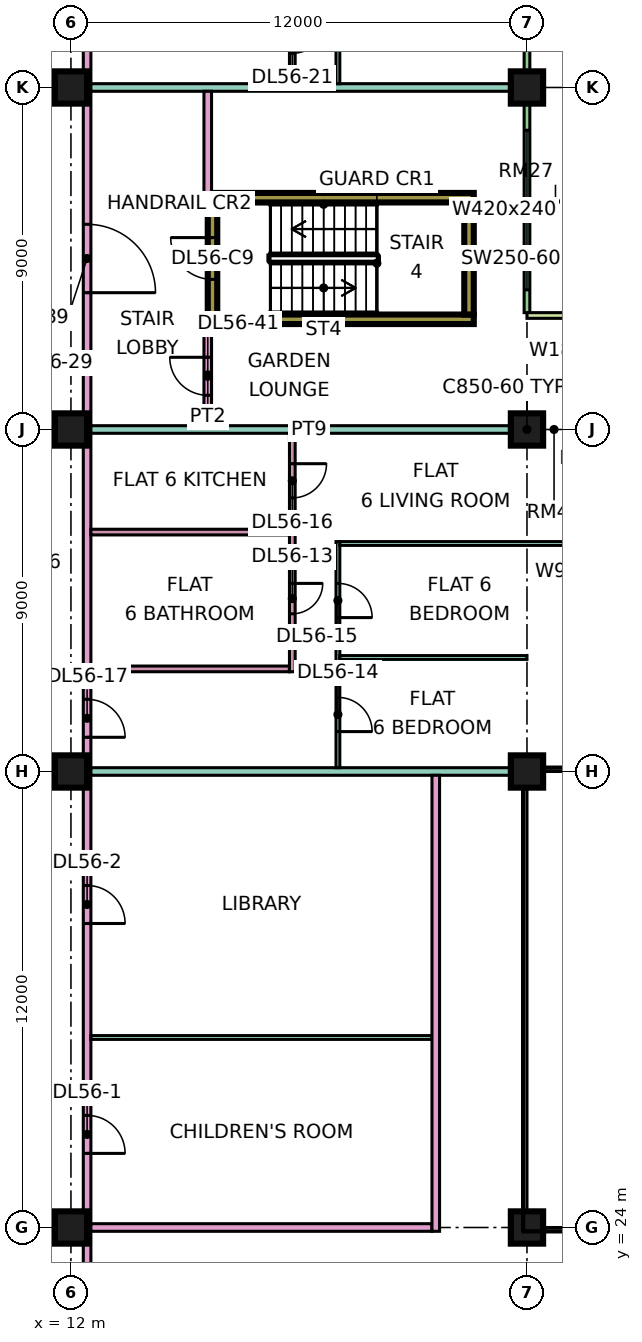
"""IFC4 building model, lengths in metres.
Left out: names, types, materials, properties, quantities, classifications, styles, units other than length and angle.
Written with IfcOpenShell. Run it as: python <this file> out.ifc"""

import sys

from ifc_helpers import new_model, si_unit, direction, frame, frame_2d, origin, origin_2d, place, context, subcontext, project, spatial, rectangle, extrude, element, fill, save


model = new_model("IFC4")
c1 = context("Model", 3, precision=1e-05, world=origin(), true_north=direction((0.0, 1.0)))
c2 = subcontext(c1, "Body", "Model", "MODEL_VIEW")
j1 = project(units=[si_unit("LENGTHUNIT", "METRE"), si_unit("PLANEANGLEUNIT", "RADIAN")], contexts=[c1])
p1 = place(None, origin())
s1 = spatial("IfcSite", under=j1, at=p1, CompositionType="ELEMENT")
p2 = place(p1, origin())
s2 = spatial("IfcBuilding", under=s1, at=p2, CompositionType="ELEMENT")
p3 = place(p2, frame((0.0, 0.0, 237.9)))
s3 = spatial("IfcBuildingStorey", under=s2, at=p3, CompositionType="ELEMENT", Elevation=237.9)
for number, where, z_axis, x_axis in (
    (1, (12.0, 24.0, 0.0), (0.0, 0.0, 1.0), (1.0, 0.0, 0.0)),
    (2, (12.0, 36.0, 0.0), (0.0, 0.0, 1.0), (1.0, 0.0, 0.0)),
    (3, (12.0, 45.0, 0.0), (0.0, 0.0, 1.0), (1.0, 0.0, 0.0)),
    (4, (12.0, 54.0, 0.0), (0.0, 0.0, 1.0), (1.0, 0.0, 0.0)),
    (5, (24.0, 24.0, 0.0), (0.0, 0.0, 1.0), (1.0, 0.0, 0.0)),
    (6, (24.0, 36.0, 0.0), (0.0, 0.0, 1.0), (1.0, 0.0, 0.0)),
    (7, (24.0, 45.0, 0.0), (0.0, 0.0, 1.0), (1.0, 0.0, 0.0)),
    (8, (24.0, 54.0, 0.0), (0.0, 0.0, 1.0), (1.0, 0.0, 0.0)),
):
    element("IfcColumn", number, at=place(p3, frame(where, z_axis=z_axis, x_axis=x_axis)), inside=s3, PredefinedType="COLUMN", context=c2, shape_type="SweptSolid", body=[
        extrude(rectangle(XDim=0.85, YDim=0.85, at=origin_2d()), origin(), (0.0, 0.0, 1.0), 3.75),
    ])
for number, where, z_axis, x_axis in (
    (9, (15.6, 47.9, 0.0), (0.0, 0.0, 1.0), (1.0, 0.0, 0.0)),
    (10, (15.6, 51.1, 0.0), (0.0, 0.0, 1.0), (1.0, 0.0, 0.0)),
):
    element("IfcWall", number, at=place(p3, frame(where, z_axis=z_axis, x_axis=x_axis)), inside=s3, PredefinedType="SHEAR", context=c2, shape_type="SweptSolid", body=[
        extrude(rectangle(XDim=7.0, YDim=0.25, at=frame_2d((3.5, 0.0))), origin(), (0.0, 0.0, 1.0), 3.75),
    ])
p4 = place(p3, frame((15.725, 48.025, 0.0), z_axis=(0.0, 0.0, 1.0), x_axis=(0.0, 1.0, 0.0)))
e11 = element("IfcWall", 11, at=p4, inside=s3, PredefinedType="SHEAR", context=c2, shape_type="SweptSolid", body=[
    extrude(rectangle(XDim=2.95, YDim=0.25, at=frame_2d((1.475, 0.0))), origin(), (0.0, 0.0, 1.0), 3.75),
])
p5 = place(p4, frame((0.925, 0.0, 0.0)))
e12 = element("IfcOpeningElement", 12, at=p5, cuts=e11, PredefinedType="OPENING", context=c2, shape_type="SweptSolid", body=[
    extrude(rectangle(XDim=1.1, YDim=2.2, at=frame_2d((0.55, 1.1))), frame((0.0, 0.135, 0.0), z_axis=(0.0, -1.0, 0.0), x_axis=(1.0, 0.0, 0.0)), (0.0, 0.0, 1.0), 0.27),
])
p6 = place(p3, frame((22.475, 48.025, 0.0), z_axis=(0.0, 0.0, 1.0), x_axis=(0.0, 1.0, 0.0)))
e13 = element("IfcWall", 13, at=p6, inside=s3, PredefinedType="SHEAR", context=c2, shape_type="SweptSolid", body=[
    extrude(rectangle(XDim=2.95, YDim=0.25, at=frame_2d((1.475, 0.0))), origin(), (0.0, 0.0, 1.0), 3.75),
])
p7 = place(p3, frame((24.0, 48.075, 0.0), z_axis=(0.0, 0.0, 1.0), x_axis=(0.0, 1.0, 0.0)))
e14 = element("IfcWall", 14, at=p7, inside=s3, PredefinedType="SOLIDWALL", context=c2, shape_type="SweptSolid", body=[
    extrude(rectangle(XDim=13.35, YDim=0.15, at=frame_2d((6.675, 0.0))), origin(), (0.0, 0.0, 1.0), 3.35),
])
p8 = place(p7, frame((0.6, 0.0, 0.45)))
e15 = element("IfcOpeningElement", 15, at=p8, cuts=e14, PredefinedType="OPENING", context=c2, shape_type="SweptSolid", body=[
    extrude(rectangle(XDim=4.2, YDim=2.4, at=frame_2d((2.1, 1.2))), frame((0.0, 0.085, 0.0), z_axis=(0.0, -1.0, 0.0), x_axis=(1.0, 0.0, 0.0)), (0.0, 0.0, 1.0), 0.17),
])
p9 = place(p7, frame((7.087, 0.0, 0.0)))
e16 = element("IfcOpeningElement", 16, at=p9, cuts=e14, PredefinedType="OPENING", context=c2, shape_type="SweptSolid", body=[
    extrude(rectangle(XDim=1.2, YDim=2.4, at=frame_2d((0.6, 1.2))), frame((0.0, 0.085, 0.0), z_axis=(0.0, -1.0, 0.0), x_axis=(1.0, 0.0, 0.0)), (0.0, 0.0, 1.0), 0.17),
])
p10 = place(p7, frame((9.525, 0.0, 0.45)))
e17 = element("IfcOpeningElement", 17, at=p10, cuts=e14, PredefinedType="OPENING", context=c2, shape_type="SweptSolid", body=[
    extrude(rectangle(XDim=1.8, YDim=2.4, at=frame_2d((0.9, 1.2))), frame((0.0, 0.085, 0.0), z_axis=(0.0, -1.0, 0.0), x_axis=(1.0, 0.0, 0.0)), (0.0, 0.0, 1.0), 0.17),
])
p11 = place(p7, frame((12.188, 0.0, 0.45)))
e18 = element("IfcOpeningElement", 18, at=p11, cuts=e14, PredefinedType="OPENING", context=c2, shape_type="SweptSolid", body=[
    extrude(rectangle(XDim=0.9, YDim=2.4, at=frame_2d((0.45, 1.2))), frame((0.0, 0.085, 0.0), z_axis=(0.0, -1.0, 0.0), x_axis=(1.0, 0.0, 0.0)), (0.0, 0.0, 1.0), 0.17),
])
p12 = place(p3, frame((25.5, 48.0, 0.0), z_axis=(0.0, 0.0, 1.0), x_axis=(-1.0, 0.0, 0.0)))
e19 = element("IfcWall", 19, at=p12, inside=s3, PredefinedType="SOLIDWALL", context=c2, shape_type="SweptSolid", body=[
    extrude(rectangle(XDim=1.5, YDim=0.15, at=frame_2d((0.75, 0.0))), origin(), (0.0, 0.0, 1.0), 3.35),
])
p13 = place(p3, frame((12.425, 20.0, 0.0), z_axis=(0.0, 0.0, 1.0), x_axis=(0.0, 1.0, 0.0)))
e20 = element("IfcWall", 20, at=p13, inside=s3, PredefinedType="PARTITIONING", context=c2, shape_type="SweptSolid", body=[
    extrude(rectangle(XDim=43.0, YDim=0.2, at=frame_2d((21.5, 0.0))), origin(), (0.0, 0.0, 1.0), 3.35),
])
p14 = place(p13, frame((5.95, 0.0, 0.0)))
e21 = element("IfcOpeningElement", 21, at=p14, cuts=e20, PredefinedType="OPENING", context=c2, shape_type="SweptSolid", body=[
    extrude(rectangle(XDim=1.0, YDim=2.1, at=frame_2d((0.5, 1.05))), frame((0.0, 0.11, 0.0), z_axis=(0.0, -1.0, 0.0), x_axis=(1.0, 0.0, 0.0)), (0.0, 0.0, 1.0), 0.22),
])
p15 = place(p13, frame((12.0, 0.0, 0.0)))
e22 = element("IfcOpeningElement", 22, at=p15, cuts=e20, PredefinedType="OPENING", context=c2, shape_type="SweptSolid", body=[
    extrude(rectangle(XDim=1.0, YDim=2.1, at=frame_2d((0.5, 1.05))), frame((0.0, 0.11, 0.0), z_axis=(0.0, -1.0, 0.0), x_axis=(1.0, 0.0, 0.0)), (0.0, 0.0, 1.0), 0.22),
])
p16 = place(p13, frame((16.9, 0.0, 0.0)))
e23 = element("IfcOpeningElement", 23, at=p16, cuts=e20, PredefinedType="OPENING", context=c2, shape_type="SweptSolid", body=[
    extrude(rectangle(XDim=1.0, YDim=2.1, at=frame_2d((0.5, 1.05))), frame((0.0, 0.11, 0.0), z_axis=(0.0, -1.0, 0.0), x_axis=(1.0, 0.0, 0.0)), (0.0, 0.0, 1.0), 0.22),
])
p17 = place(p13, frame((41.05, 0.0, 0.0)))
e24 = element("IfcOpeningElement", 24, at=p17, cuts=e20, PredefinedType="OPENING", context=c2, shape_type="SweptSolid", body=[
    extrude(rectangle(XDim=1.0, YDim=2.1, at=frame_2d((0.5, 1.05))), frame((0.0, 0.11, 0.0), z_axis=(0.0, -1.0, 0.0), x_axis=(1.0, 0.0, 0.0)), (0.0, 0.0, 1.0), 0.22),
])
p18 = place(p13, frame((1.15, 0.0, 0.0)))
e25 = element("IfcOpeningElement", 25, at=p18, cuts=e20, PredefinedType="OPENING", context=c2, shape_type="SweptSolid", body=[
    extrude(rectangle(XDim=1.8, YDim=2.1, at=frame_2d((0.9, 1.05))), frame((0.0, 0.11, 0.0), z_axis=(0.0, -1.0, 0.0), x_axis=(1.0, 0.0, 0.0)), (0.0, 0.0, 1.0), 0.22),
])
p19 = place(p13, frame((28.6, 0.0, 0.0)))
e26 = element("IfcOpeningElement", 26, at=p19, cuts=e20, PredefinedType="OPENING", context=c2, shape_type="SweptSolid", body=[
    extrude(rectangle(XDim=1.8, YDim=2.1, at=frame_2d((0.9, 1.05))), frame((0.0, 0.11, 0.0), z_axis=(0.0, -1.0, 0.0), x_axis=(1.0, 0.0, 0.0)), (0.0, 0.0, 1.0), 0.22),
])
p20 = place(p3, frame((12.525, 24.0, 0.0), z_axis=(0.0, 0.0, 1.0), x_axis=(1.0, 0.0, 0.0)))
e27 = element("IfcWall", 27, at=p20, inside=s3, PredefinedType="PARTITIONING", context=c2, shape_type="SweptSolid", body=[
    extrude(rectangle(XDim=8.975, YDim=0.2, at=frame_2d((4.488, 0.0))), origin(), (0.0, 0.0, 1.0), 3.35),
])
p21 = place(p3, frame((12.525, 29.0, 0.0), z_axis=(0.0, 0.0, 1.0), x_axis=(1.0, 0.0, 0.0)))
e28 = element("IfcWall", 28, at=p21, inside=s3, PredefinedType="PARTITIONING", context=c2, shape_type="SweptSolid", body=[
    extrude(rectangle(XDim=8.975, YDim=0.1, at=frame_2d((4.488, 0.0))), origin(), (0.0, 0.0, 1.0), 3.35),
])
p22 = place(p3, frame((12.525, 36.0, 0.0), z_axis=(0.0, 0.0, 1.0), x_axis=(1.0, 0.0, 0.0)))
e29 = element("IfcWall", 29, at=p22, inside=s3, PredefinedType="PARTITIONING", context=c2, shape_type="SweptSolid", body=[
    extrude(rectangle(XDim=11.475, YDim=0.2, at=frame_2d((5.738, 0.0))), origin(), (0.0, 0.0, 1.0), 3.35),
])
for number, where, z_axis, x_axis in (
    (30, (12.525, 38.7, 0.0), (0.0, 0.0, 1.0), (1.0, 0.0, 0.0)),
    (31, (12.525, 42.3, 0.0), (0.0, 0.0, 1.0), (1.0, 0.0, 0.0)),
):
    element("IfcWall", number, at=place(p3, frame(where, z_axis=z_axis, x_axis=x_axis)), inside=s3, PredefinedType="PARTITIONING", context=c2, shape_type="SweptSolid", body=[
        extrude(rectangle(XDim=5.225, YDim=0.15, at=frame_2d((2.613, 0.0))), origin(), (0.0, 0.0, 1.0), 3.35),
    ])
p23 = place(p3, frame((12.525, 45.0, 0.0), z_axis=(0.0, 0.0, 1.0), x_axis=(1.0, 0.0, 0.0)))
e32 = element("IfcWall", 32, at=p23, inside=s3, PredefinedType="PARTITIONING", context=c2, shape_type="SweptSolid", body=[
    extrude(rectangle(XDim=11.475, YDim=0.2, at=frame_2d((5.738, 0.0))), origin(), (0.0, 0.0, 1.0), 3.35),
])
p24 = place(p3, frame((12.525, 54.0, 0.0), z_axis=(0.0, 0.0, 1.0), x_axis=(1.0, 0.0, 0.0)))
e33 = element("IfcWall", 33, at=p24, inside=s3, PredefinedType="PARTITIONING", context=c2, shape_type="SweptSolid", body=[
    extrude(rectangle(XDim=11.401, YDim=0.2, at=frame_2d((5.701, 0.0))), origin(), (0.0, 0.0, 1.0), 3.35),
])
p25 = place(p3, frame((15.6, 45.1, 0.0), z_axis=(0.0, 0.0, 1.0), x_axis=(0.0, 1.0, 0.0)))
e34 = element("IfcWall", 34, at=p25, inside=s3, PredefinedType="PARTITIONING", context=c2, shape_type="SweptSolid", body=[
    extrude(rectangle(XDim=2.675, YDim=0.2, at=frame_2d((1.337, 0.0))), origin(), (0.0, 0.0, 1.0), 3.35),
])
p26 = place(p25, frame((0.8, 0.0, 0.0)))
e35 = element("IfcOpeningElement", 35, at=p26, cuts=e34, PredefinedType="OPENING", context=c2, shape_type="SweptSolid", body=[
    extrude(rectangle(XDim=1.0, YDim=2.1, at=frame_2d((0.5, 1.05))), frame((0.0, 0.11, 0.0), z_axis=(0.0, -1.0, 0.0), x_axis=(1.0, 0.0, 0.0)), (0.0, 0.0, 1.0), 0.22),
])
p27 = place(p3, frame((15.6, 51.225, 0.0), z_axis=(0.0, 0.0, 1.0), x_axis=(0.0, 1.0, 0.0)))
e36 = element("IfcWall", 36, at=p27, inside=s3, PredefinedType="PARTITIONING", context=c2, shape_type="SweptSolid", body=[
    extrude(rectangle(XDim=2.675, YDim=0.2, at=frame_2d((1.337, 0.0))), origin(), (0.0, 0.0, 1.0), 3.35),
])
p28 = place(p3, frame((17.825, 38.625, 0.0), z_axis=(0.0, 0.0, 1.0), x_axis=(0.0, 1.0, 0.0)))
e37 = element("IfcWall", 37, at=p28, inside=s3, PredefinedType="PARTITIONING", context=c2, shape_type="SweptSolid", body=[
    extrude(rectangle(XDim=6.275, YDim=0.15, at=frame_2d((3.137, 0.0))), origin(), (0.0, 0.0, 1.0), 3.35),
])
p29 = place(p28, frame((1.525, 0.0, 0.0)))
e38 = element("IfcOpeningElement", 38, at=p29, cuts=e37, PredefinedType="OPENING", context=c2, shape_type="SweptSolid", body=[
    extrude(rectangle(XDim=0.8, YDim=2.1, at=frame_2d((0.4, 1.05))), frame((0.0, 0.085, 0.0), z_axis=(0.0, -1.0, 0.0), x_axis=(1.0, 0.0, 0.0)), (0.0, 0.0, 1.0), 0.17),
])
p30 = place(p28, frame((4.575, 0.0, 0.0)))
e39 = element("IfcOpeningElement", 39, at=p30, cuts=e37, PredefinedType="OPENING", context=c2, shape_type="SweptSolid", body=[
    extrude(rectangle(XDim=0.9, YDim=2.1, at=frame_2d((0.45, 1.05))), frame((0.0, 0.085, 0.0), z_axis=(0.0, -1.0, 0.0), x_axis=(1.0, 0.0, 0.0)), (0.0, 0.0, 1.0), 0.17),
])
p31 = place(p3, frame((17.825, 54.1, 0.0), z_axis=(0.0, 0.0, 1.0), x_axis=(0.0, 1.0, 0.0)))
e40 = element("IfcWall", 40, at=p31, inside=s3, PredefinedType="PARTITIONING", context=c2, shape_type="SweptSolid", body=[
    extrude(rectangle(XDim=5.975, YDim=0.15, at=frame_2d((2.987, 0.0))), origin(), (0.0, 0.0, 1.0), 3.35),
])
p32 = place(p31, frame((3.9, 0.0, 0.0)))
e41 = element("IfcOpeningElement", 41, at=p32, cuts=e40, PredefinedType="OPENING", context=c2, shape_type="SweptSolid", body=[
    extrude(rectangle(XDim=0.8, YDim=2.1, at=frame_2d((0.4, 1.05))), frame((0.0, 0.085, 0.0), z_axis=(0.0, -1.0, 0.0), x_axis=(1.0, 0.0, 0.0)), (0.0, 0.0, 1.0), 0.17),
])
p33 = place(p31, frame((0.8, 0.0, 0.0)))
e42 = element("IfcOpeningElement", 42, at=p33, cuts=e40, PredefinedType="OPENING", context=c2, shape_type="SweptSolid", body=[
    extrude(rectangle(XDim=0.9, YDim=2.1, at=frame_2d((0.45, 1.05))), frame((0.0, 0.085, 0.0), z_axis=(0.0, -1.0, 0.0), x_axis=(1.0, 0.0, 0.0)), (0.0, 0.0, 1.0), 0.17),
])
p34 = place(p3, frame((19.025, 36.1, 0.0), z_axis=(0.0, 0.0, 1.0), x_axis=(0.0, 1.0, 0.0)))
e43 = element("IfcWall", 43, at=p34, inside=s3, PredefinedType="PARTITIONING", context=c2, shape_type="SweptSolid", body=[
    extrude(rectangle(XDim=5.95, YDim=0.1, at=frame_2d((2.975, 0.0))), origin(), (0.0, 0.0, 1.0), 3.35),
])
p35 = place(p34, frame((0.95, 0.0, 0.0)))
e44 = element("IfcOpeningElement", 44, at=p35, cuts=e43, PredefinedType="OPENING", context=c2, shape_type="SweptSolid", body=[
    extrude(rectangle(XDim=0.9, YDim=2.1, at=frame_2d((0.45, 1.05))), frame((0.0, 0.06, 0.0), z_axis=(0.0, -1.0, 0.0), x_axis=(1.0, 0.0, 0.0)), (0.0, 0.0, 1.0), 0.12),
])
p36 = place(p34, frame((3.95, 0.0, 0.0)))
e45 = element("IfcOpeningElement", 45, at=p36, cuts=e43, PredefinedType="OPENING", context=c2, shape_type="SweptSolid", body=[
    extrude(rectangle(XDim=0.9, YDim=2.1, at=frame_2d((0.45, 1.05))), frame((0.0, 0.06, 0.0), z_axis=(0.0, -1.0, 0.0), x_axis=(1.0, 0.0, 0.0)), (0.0, 0.0, 1.0), 0.12),
])
p37 = place(p3, frame((19.025, 54.1, 0.0), z_axis=(0.0, 0.0, 1.0), x_axis=(0.0, 1.0, 0.0)))
e46 = element("IfcWall", 46, at=p37, inside=s3, PredefinedType="PARTITIONING", context=c2, shape_type="SweptSolid", body=[
    extrude(rectangle(XDim=2.85, YDim=0.1, at=frame_2d((1.425, 0.0))), origin(), (0.0, 0.0, 1.0), 3.35),
])
p38 = place(p37, frame((0.95, 0.0, 0.0)))
e47 = element("IfcOpeningElement", 47, at=p38, cuts=e46, PredefinedType="OPENING", context=c2, shape_type="SweptSolid", body=[
    extrude(rectangle(XDim=0.9, YDim=2.1, at=frame_2d((0.45, 1.05))), frame((0.0, 0.06, 0.0), z_axis=(0.0, -1.0, 0.0), x_axis=(1.0, 0.0, 0.0)), (0.0, 0.0, 1.0), 0.12),
])
p39 = place(p3, frame((19.075, 39.0, 0.0), z_axis=(0.0, 0.0, 1.0), x_axis=(1.0, 0.0, 0.0)))
e48 = element("IfcWall", 48, at=p39, inside=s3, PredefinedType="PARTITIONING", context=c2, shape_type="SweptSolid", body=[
    extrude(rectangle(XDim=4.925, YDim=0.1, at=frame_2d((2.462, 0.0))), origin(), (0.0, 0.0, 1.0), 3.35),
])
p40 = place(p3, frame((19.075, 42.0, 0.0), z_axis=(0.0, 0.0, 1.0), x_axis=(1.0, 0.0, 0.0)))
e49 = element("IfcWall", 49, at=p40, inside=s3, PredefinedType="PARTITIONING", context=c2, shape_type="SweptSolid", body=[
    extrude(rectangle(XDim=6.275, YDim=0.1, at=frame_2d((3.138, 0.0))), origin(), (0.0, 0.0, 1.0), 3.35),
])
p41 = place(p3, frame((21.6, 23.9, 0.0), z_axis=(0.0, 0.0, 1.0), x_axis=(0.0, 1.0, 0.0)))
e50 = element("IfcWall", 50, at=p41, inside=s3, PredefinedType="PARTITIONING", context=c2, shape_type="SweptSolid", body=[
    extrude(rectangle(XDim=12.0, YDim=0.2, at=frame_2d((6.0, 0.0))), origin(), (0.0, 0.0, 1.0), 3.35),
])
p42 = place(p8, origin())
e51 = element("IfcWindow", 51, at=p42, inside=s3, PartitioningType="SINGLE_PANEL", PredefinedType="WINDOW", context=c2, shape_type="SweptSolid", body=[
    extrude(rectangle(XDim=4.2, YDim=2.4, at=frame_2d((2.1, 1.2))), frame((0.0, 0.03, 0.0), z_axis=(0.0, -1.0, 0.0), x_axis=(1.0, 0.0, 0.0)), (0.0, 0.0, 1.0), 0.06),
])
fill(e15, e51)
p43 = place(p5, frame((1.1, 0.0, 0.0), z_axis=(0.0, 0.0, 1.0), x_axis=(-1.0, 0.0, 0.0)))
e52 = element("IfcDoor", 52, at=p43, inside=s3, OperationType="SINGLE_SWING_RIGHT", PredefinedType="DOOR", context=c2, shape_type="SweptSolid", body=[
    extrude(rectangle(XDim=1.1, YDim=2.2, at=frame_2d((0.55, 1.1))), frame((0.0, 0.025, 0.0), z_axis=(0.0, -1.0, 0.0), x_axis=(1.0, 0.0, 0.0)), (0.0, 0.0, 1.0), 0.05),
])
fill(e12, e52)
p44 = place(p14, frame((1.0, 0.0, 0.0), z_axis=(0.0, 0.0, 1.0), x_axis=(-1.0, 0.0, 0.0)))
e53 = element("IfcDoor", 53, at=p44, inside=s3, OperationType="SINGLE_SWING_LEFT", PredefinedType="DOOR", context=c2, shape_type="SweptSolid", body=[
    extrude(rectangle(XDim=1.0, YDim=2.1, at=frame_2d((0.5, 1.05))), frame((0.0, 0.025, 0.0), z_axis=(0.0, -1.0, 0.0), x_axis=(1.0, 0.0, 0.0)), (0.0, 0.0, 1.0), 0.05),
])
fill(e21, e53)
p45 = place(p15, frame((1.0, 0.0, 0.0), z_axis=(0.0, 0.0, 1.0), x_axis=(-1.0, 0.0, 0.0)))
e54 = element("IfcDoor", 54, at=p45, inside=s3, OperationType="SINGLE_SWING_LEFT", PredefinedType="DOOR", context=c2, shape_type="SweptSolid", body=[
    extrude(rectangle(XDim=1.0, YDim=2.1, at=frame_2d((0.5, 1.05))), frame((0.0, 0.025, 0.0), z_axis=(0.0, -1.0, 0.0), x_axis=(1.0, 0.0, 0.0)), (0.0, 0.0, 1.0), 0.05),
])
fill(e22, e54)
p46 = place(p29, origin())
e55 = element("IfcDoor", 55, at=p46, inside=s3, OperationType="SINGLE_SWING_RIGHT", PredefinedType="DOOR", context=c2, shape_type="SweptSolid", body=[
    extrude(rectangle(XDim=0.8, YDim=2.1, at=frame_2d((0.4, 1.05))), frame((0.0, 0.025, 0.0), z_axis=(0.0, -1.0, 0.0), x_axis=(1.0, 0.0, 0.0)), (0.0, 0.0, 1.0), 0.05),
])
fill(e38, e55)
p47 = place(p35, frame((0.9, 0.0, 0.0), z_axis=(0.0, 0.0, 1.0), x_axis=(-1.0, 0.0, 0.0)))
e56 = element("IfcDoor", 56, at=p47, inside=s3, OperationType="SINGLE_SWING_LEFT", PredefinedType="DOOR", context=c2, shape_type="SweptSolid", body=[
    extrude(rectangle(XDim=0.9, YDim=2.1, at=frame_2d((0.45, 1.05))), frame((0.0, 0.025, 0.0), z_axis=(0.0, -1.0, 0.0), x_axis=(1.0, 0.0, 0.0)), (0.0, 0.0, 1.0), 0.05),
])
fill(e44, e56)
p48 = place(p36, frame((0.9, 0.0, 0.0), z_axis=(0.0, 0.0, 1.0), x_axis=(-1.0, 0.0, 0.0)))
e57 = element("IfcDoor", 57, at=p48, inside=s3, OperationType="SINGLE_SWING_LEFT", PredefinedType="DOOR", context=c2, shape_type="SweptSolid", body=[
    extrude(rectangle(XDim=0.9, YDim=2.1, at=frame_2d((0.45, 1.05))), frame((0.0, 0.025, 0.0), z_axis=(0.0, -1.0, 0.0), x_axis=(1.0, 0.0, 0.0)), (0.0, 0.0, 1.0), 0.05),
])
fill(e45, e57)
p49 = place(p30, origin())
e58 = element("IfcDoor", 58, at=p49, inside=s3, OperationType="SINGLE_SWING_RIGHT", PredefinedType="DOOR", context=c2, shape_type="SweptSolid", body=[
    extrude(rectangle(XDim=0.9, YDim=2.1, at=frame_2d((0.45, 1.05))), frame((0.0, 0.025, 0.0), z_axis=(0.0, -1.0, 0.0), x_axis=(1.0, 0.0, 0.0)), (0.0, 0.0, 1.0), 0.05),
])
fill(e39, e58)
p50 = place(p16, frame((1.0, 0.0, 0.0), z_axis=(0.0, 0.0, 1.0), x_axis=(-1.0, 0.0, 0.0)))
e59 = element("IfcDoor", 59, at=p50, inside=s3, OperationType="SINGLE_SWING_LEFT", PredefinedType="DOOR", context=c2, shape_type="SweptSolid", body=[
    extrude(rectangle(XDim=1.0, YDim=2.1, at=frame_2d((0.5, 1.05))), frame((0.0, 0.025, 0.0), z_axis=(0.0, -1.0, 0.0), x_axis=(1.0, 0.0, 0.0)), (0.0, 0.0, 1.0), 0.05),
])
fill(e23, e59)
p51 = place(p33, origin())
e60 = element("IfcDoor", 60, at=p51, inside=s3, OperationType="SINGLE_SWING_RIGHT", PredefinedType="DOOR", context=c2, shape_type="SweptSolid", body=[
    extrude(rectangle(XDim=0.9, YDim=2.1, at=frame_2d((0.45, 1.05))), frame((0.0, 0.025, 0.0), z_axis=(0.0, -1.0, 0.0), x_axis=(1.0, 0.0, 0.0)), (0.0, 0.0, 1.0), 0.05),
])
fill(e42, e60)
p52 = place(p19, frame((1.8, 0.0, 0.0), z_axis=(0.0, 0.0, 1.0), x_axis=(-1.0, 0.0, 0.0)))
e61 = element("IfcDoor", 61, at=p52, inside=s3, OperationType="DOUBLE_DOOR_SINGLE_SWING", PredefinedType="DOOR", context=c2, shape_type="SweptSolid", body=[
    extrude(rectangle(XDim=1.8, YDim=2.1, at=frame_2d((0.9, 1.05))), frame((0.0, 0.025, 0.0), z_axis=(0.0, -1.0, 0.0), x_axis=(1.0, 0.0, 0.0)), (0.0, 0.0, 1.0), 0.05),
])
fill(e26, e61)
p53 = place(p26, frame((1.0, 0.0, 0.0), z_axis=(0.0, 0.0, 1.0), x_axis=(-1.0, 0.0, 0.0)))
e62 = element("IfcDoor", 62, at=p53, inside=s3, OperationType="SINGLE_SWING_RIGHT", PredefinedType="DOOR", context=c2, shape_type="SweptSolid", body=[
    extrude(rectangle(XDim=1.0, YDim=2.1, at=frame_2d((0.5, 1.05))), frame((0.0, 0.025, 0.0), z_axis=(0.0, -1.0, 0.0), x_axis=(1.0, 0.0, 0.0)), (0.0, 0.0, 1.0), 0.05),
])
fill(e35, e62)
save(model, sys.argv[1])
